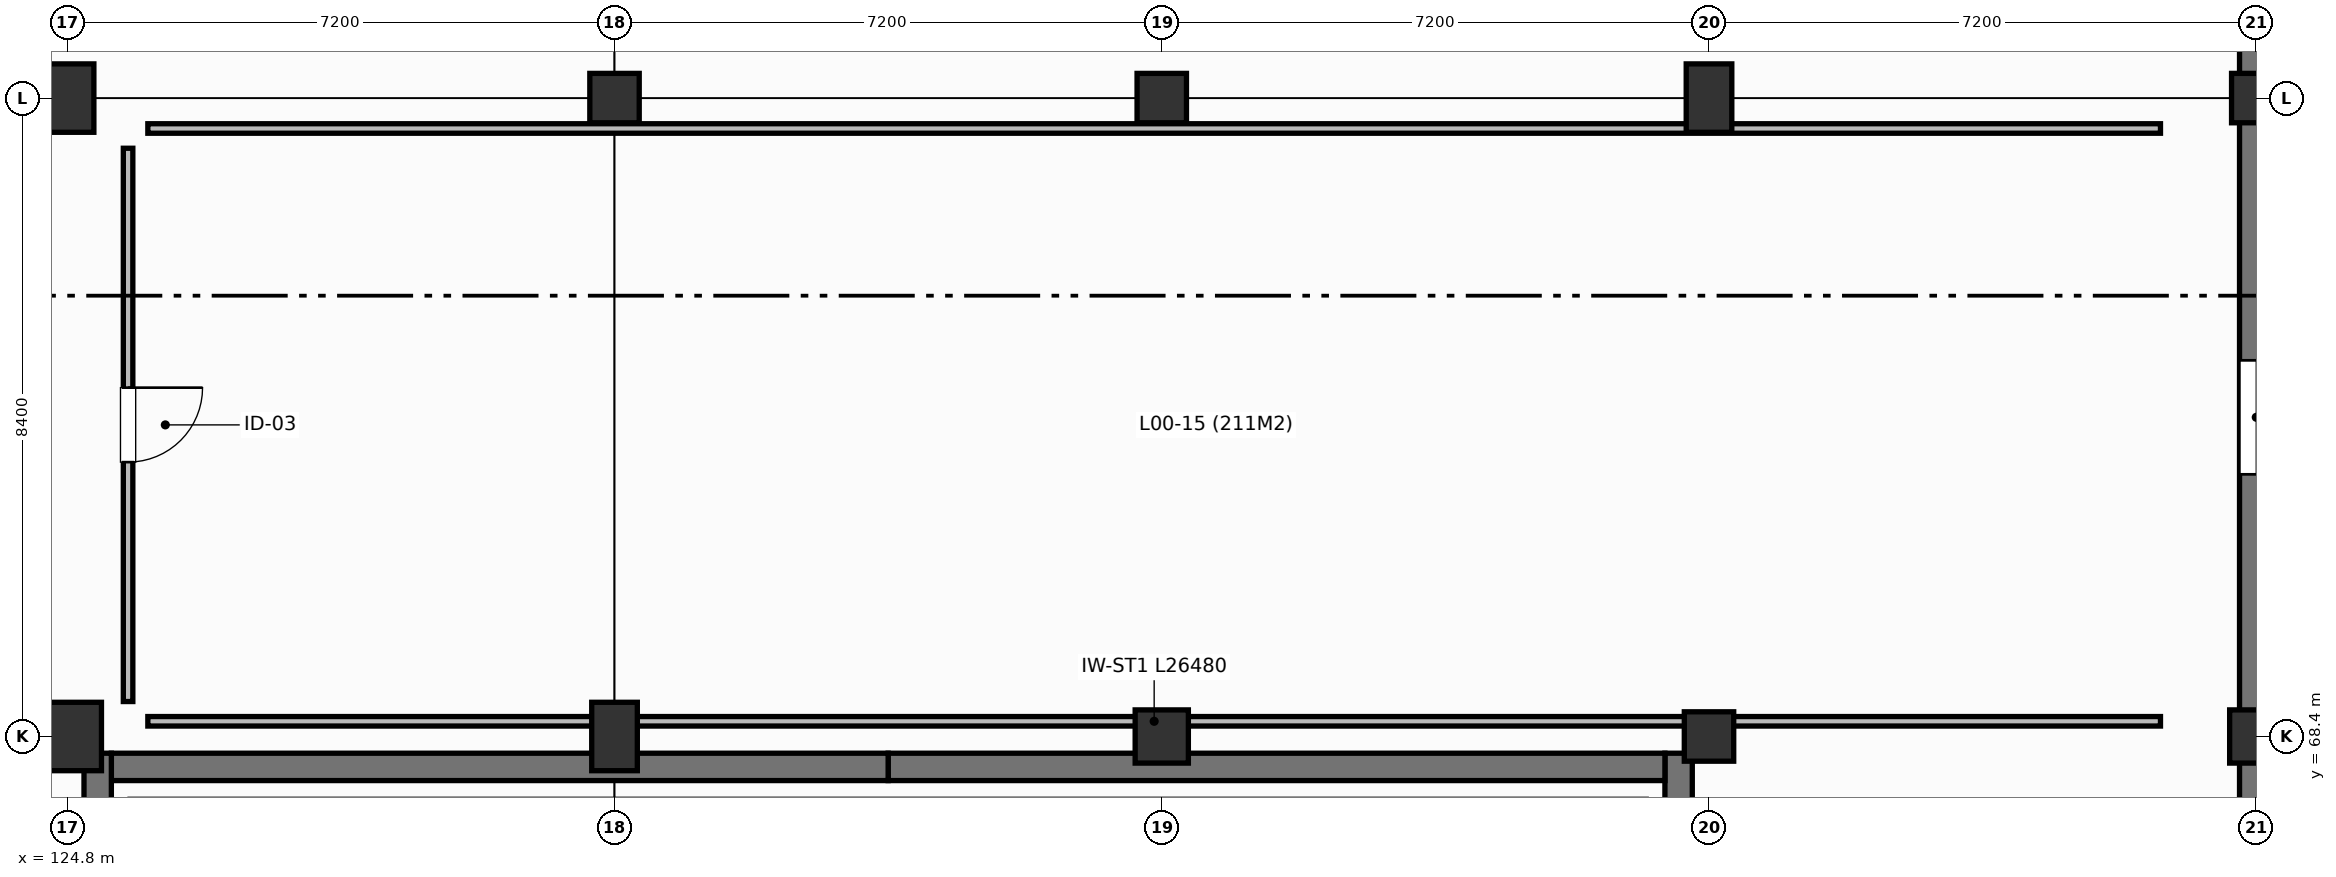
"""IFC4 building model, lengths in metres.
Left out: names, types, materials, properties, quantities, classifications, styles, units other than length and angle.
Written with IfcOpenShell. Run it as: python <this file> out.ifc"""

import sys

from ifc_helpers import new_model, si_unit, direction, frame, frame_2d, origin, origin_2d, place, context, subcontext, project, spatial, rectangle, extrude, element, fill, save


model = new_model("IFC4")
c1 = context("Model", 3, precision=1e-05, world=origin(), true_north=direction((0.0, 1.0)))
c2 = subcontext(c1, "Body", "Model", "MODEL_VIEW")
j1 = project(units=[si_unit("LENGTHUNIT", "METRE"), si_unit("PLANEANGLEUNIT", "RADIAN")], contexts=[c1])
p1 = place(None, origin())
s1 = spatial("IfcSite", under=j1, at=p1, CompositionType="ELEMENT")
p2 = place(p1, origin())
s2 = spatial("IfcBuilding", under=s1, at=p2, CompositionType="ELEMENT")
p3 = place(p2, origin())
s3 = spatial("IfcBuildingStorey", under=s2, at=p3, CompositionType="ELEMENT", Elevation=0.0)
p4 = place(p3, frame((124.8, 68.4, 0.0), z_axis=(0.0, 0.0, 1.0), x_axis=(1.0, 0.0, 0.0)))
e1 = element("IfcColumn", 1, at=p4, inside=s3, PredefinedType="COLUMN", context=c2, shape_type="SweptSolid", body=[
    extrude(rectangle(XDim=0.9, YDim=0.9, at=origin_2d()), origin(), (0.0, 0.0, 1.0), 4.8),
])
p5 = place(p3, frame((124.8, 76.8, 0.0), z_axis=(0.0, 0.0, 1.0), x_axis=(1.0, 0.0, 0.0)))
e2 = element("IfcColumn", 2, at=p5, inside=s3, PredefinedType="COLUMN", context=c2, shape_type="SweptSolid", body=[
    extrude(rectangle(XDim=0.7, YDim=0.9, at=origin_2d()), origin(), (0.0, 0.0, 1.0), 4.8),
])
p6 = place(p3, frame((132.0, 68.4, 0.0), z_axis=(0.0, 0.0, 1.0), x_axis=(1.0, 0.0, 0.0)))
e3 = element("IfcColumn", 3, at=p6, inside=s3, PredefinedType="COLUMN", context=c2, shape_type="SweptSolid", body=[
    extrude(rectangle(XDim=0.6, YDim=0.9, at=origin_2d()), origin(), (0.0, 0.0, 1.0), 4.8),
])
p7 = place(p3, frame((132.0, 76.8, 0.0), z_axis=(0.0, 0.0, 1.0), x_axis=(1.0, 0.0, 0.0)))
e4 = element("IfcColumn", 4, at=p7, inside=s3, PredefinedType="COLUMN", context=c2, shape_type="SweptSolid", body=[
    extrude(rectangle(XDim=0.65, YDim=0.65, at=origin_2d()), origin(), (0.0, 0.0, 1.0), 4.8),
])
p8 = place(p3, frame((139.2, 68.4, 0.0), z_axis=(0.0, 0.0, 1.0), x_axis=(1.0, 0.0, 0.0)))
e5 = element("IfcColumn", 5, at=p8, inside=s3, PredefinedType="COLUMN", context=c2, shape_type="SweptSolid", body=[
    extrude(rectangle(XDim=0.7, YDim=0.7, at=origin_2d()), origin(), (0.0, 0.0, 1.0), 4.8),
])
for number, where, z_axis, x_axis in (
    (6, (139.2, 76.8, 0.0), (0.0, 0.0, 1.0), (1.0, 0.0, 0.0)),
    (7, (146.4, 68.4, 0.0), (0.0, 0.0, 1.0), (1.0, 0.0, 0.0)),
):
    element("IfcColumn", number, at=place(p3, frame(where, z_axis=z_axis, x_axis=x_axis)), inside=s3, PredefinedType="COLUMN", context=c2, shape_type="SweptSolid", body=[
        extrude(rectangle(XDim=0.65, YDim=0.65, at=origin_2d()), origin(), (0.0, 0.0, 1.0), 4.8),
    ])
p9 = place(p3, frame((146.4, 76.8, 0.0), z_axis=(0.0, 0.0, 1.0), x_axis=(1.0, 0.0, 0.0)))
e8 = element("IfcColumn", 8, at=p9, inside=s3, PredefinedType="COLUMN", context=c2, shape_type="SweptSolid", body=[
    extrude(rectangle(XDim=0.6, YDim=0.9, at=origin_2d()), origin(), (0.0, 0.0, 1.0), 4.8),
])
p10 = place(p3, frame((153.6, 68.4, 0.0), z_axis=(0.0, 0.0, 1.0), x_axis=(1.0, 0.0, 0.0)))
e9 = element("IfcColumn", 9, at=p10, inside=s3, PredefinedType="COLUMN", context=c2, shape_type="SweptSolid", body=[
    extrude(rectangle(XDim=0.7, YDim=0.7, at=origin_2d()), origin(), (0.0, 0.0, 1.0), 4.8),
])
p11 = place(p3, frame((153.6, 76.8, 0.0), z_axis=(0.0, 0.0, 1.0), x_axis=(1.0, 0.0, 0.0)))
e10 = element("IfcColumn", 10, at=p11, inside=s3, PredefinedType="COLUMN", context=c2, shape_type="SweptSolid", body=[
    extrude(rectangle(XDim=0.65, YDim=0.65, at=origin_2d()), origin(), (0.0, 0.0, 1.0), 4.8),
])
p12 = place(p3, frame((153.6, 83.2, 0.0), z_axis=(0.0, 0.0, 1.0), x_axis=(0.0, -1.0, 0.0)))
e11 = element("IfcWall", 11, at=p12, inside=s3, PredefinedType="STANDARD", context=c2, shape_type="SweptSolid", body=[
    extrude(rectangle(XDim=6.4, YDim=0.44, at=frame_2d((3.2, 0.0))), origin(), (0.0, 0.0, 1.0), 4.44),
])
p13 = place(p12, frame((2.6, 0.0, 0.8)))
e12 = element("IfcOpeningElement", 12, at=p13, cuts=e11, PredefinedType="OPENING", context=c2, shape_type="SweptSolid", body=[
    extrude(rectangle(XDim=1.2, YDim=1.65, at=frame_2d((0.6, 0.825))), frame((0.0, 0.23, 0.0), z_axis=(0.0, -1.0, 0.0), x_axis=(1.0, 0.0, 0.0)), (0.0, 0.0, 1.0), 0.46),
])
p14 = place(p3, frame((153.6, 76.8, 0.0), z_axis=(0.0, 0.0, 1.0), x_axis=(0.0, -1.0, 0.0)))
e13 = element("IfcWall", 13, at=p14, inside=s3, PredefinedType="STANDARD", context=c2, shape_type="SweptSolid", body=[
    extrude(rectangle(XDim=8.4, YDim=0.44, at=frame_2d((4.2, 0.0))), origin(), (0.0, 0.0, 1.0), 4.44),
])
p15 = place(p14, frame((3.45, 0.0, 0.8)))
e14 = element("IfcOpeningElement", 14, at=p15, cuts=e13, PredefinedType="OPENING", context=c2, shape_type="SweptSolid", body=[
    extrude(rectangle(XDim=1.5, YDim=1.65, at=frame_2d((0.75, 0.825))), frame((0.0, 0.23, 0.0), z_axis=(0.0, -1.0, 0.0), x_axis=(1.0, 0.0, 0.0)), (0.0, 0.0, 1.0), 0.46),
])
p16 = place(p3, frame((153.6, 68.4, 0.0), z_axis=(0.0, 0.0, 1.0), x_axis=(0.0, -1.0, 0.0)))
e15 = element("IfcWall", 15, at=p16, inside=s3, PredefinedType="STANDARD", context=c2, shape_type="SweptSolid", body=[
    extrude(rectangle(XDim=8.4, YDim=0.44, at=frame_2d((4.2, 0.0))), origin(), (0.0, 0.0, 1.0), 4.44),
])
p17 = place(p16, frame((3.3, 0.0, 0.8)))
e16 = element("IfcOpeningElement", 16, at=p17, cuts=e15, PredefinedType="OPENING", context=c2, shape_type="SweptSolid", body=[
    extrude(rectangle(XDim=1.8, YDim=1.65, at=frame_2d((0.9, 0.825))), frame((0.0, 0.23, 0.0), z_axis=(0.0, -1.0, 0.0), x_axis=(1.0, 0.0, 0.0)), (0.0, 0.0, 1.0), 0.46),
])
p18 = place(p3, frame((146.0, 60.0, 0.0), z_axis=(0.0, 0.0, 1.0), x_axis=(0.0, 1.0, 0.0)))
e17 = element("IfcWall", 17, at=p18, inside=s3, PredefinedType="SHEAR", context=c2, shape_type="SweptSolid", body=[
    extrude(rectangle(XDim=8.18, YDim=0.36, at=frame_2d((4.09, 0.0))), origin(), (0.0, 0.0, 1.0), 4.8),
])
p19 = place(p18, frame((3.19, 0.0, 0.0)))
e18 = element("IfcOpeningElement", 18, at=p19, cuts=e17, PredefinedType="OPENING", context=c2, shape_type="SweptSolid", body=[
    extrude(rectangle(XDim=1.8, YDim=2.25, at=frame_2d((0.9, 1.125))), frame((0.0, 0.19, 0.0), z_axis=(0.0, -1.0, 0.0), x_axis=(1.0, 0.0, 0.0)), (0.0, 0.0, 1.0), 0.38),
])
p20 = place(p3, frame((145.82, 68.0, 0.0), z_axis=(0.0, 0.0, 1.0), x_axis=(-1.0, 0.0, 0.0)))
e19 = element("IfcWall", 19, at=p20, inside=s3, PredefinedType="SHEAR", context=c2, shape_type="SweptSolid", body=[
    extrude(rectangle(XDim=10.22, YDim=0.36, at=frame_2d((5.11, 0.0))), origin(), (0.0, 0.0, 1.0), 4.8),
])
p21 = place(p3, frame((135.6, 68.0, 0.0), z_axis=(0.0, 0.0, 1.0), x_axis=(-1.0, 0.0, 0.0)))
e20 = element("IfcWall", 20, at=p21, inside=s3, PredefinedType="SHEAR", context=c2, shape_type="SweptSolid", body=[
    extrude(rectangle(XDim=10.22, YDim=0.36, at=frame_2d((5.11, 0.0))), origin(), (0.0, 0.0, 1.0), 4.8),
])
p22 = place(p3, frame((125.2, 68.18, 0.0), z_axis=(0.0, 0.0, 1.0), x_axis=(0.0, -1.0, 0.0)))
e21 = element("IfcWall", 21, at=p22, inside=s3, PredefinedType="SHEAR", context=c2, shape_type="SweptSolid", body=[
    extrude(rectangle(XDim=8.18, YDim=0.36, at=frame_2d((4.09, 0.0))), origin(), (0.0, 0.0, 1.0), 4.8),
])
p23 = place(p3, frame((125.86, 68.6, 0.0), z_axis=(0.0, 0.0, 1.0), x_axis=(1.0, 0.0, 0.0)))
e22 = element("IfcWall", 22, at=p23, inside=s3, PredefinedType="PARTITIONING", context=c2, shape_type="SweptSolid", body=[
    extrude(rectangle(XDim=26.48, YDim=0.125, at=frame_2d((13.24, 0.0))), origin(), (0.0, 0.0, 1.0), 3.515),
])
p24 = place(p3, frame((152.34, 76.4, 0.0), z_axis=(0.0, 0.0, 1.0), x_axis=(-1.0, 0.0, 0.0)))
e23 = element("IfcWall", 23, at=p24, inside=s3, PredefinedType="PARTITIONING", context=c2, shape_type="SweptSolid", body=[
    extrude(rectangle(XDim=26.48, YDim=0.125, at=frame_2d((13.24, 0.0))), origin(), (0.0, 0.0, 1.0), 3.715),
])
p25 = place(p3, frame((125.6, 76.14, 0.0), z_axis=(0.0, 0.0, 1.0), x_axis=(0.0, -1.0, 0.0)))
e24 = element("IfcWall", 24, at=p25, inside=s3, PredefinedType="PARTITIONING", context=c2, shape_type="SweptSolid", body=[
    extrude(rectangle(XDim=7.28, YDim=0.125, at=frame_2d((3.64, 0.0))), origin(), (0.0, 0.0, 1.0), 4.44),
])
p26 = place(p25, frame((3.15, 0.0, 0.0)))
e25 = element("IfcOpeningElement", 25, at=p26, cuts=e24, PredefinedType="OPENING", context=c2, shape_type="SweptSolid", body=[
    extrude(rectangle(XDim=0.98, YDim=2.1, at=frame_2d((0.49, 1.05))), frame((0.0, 0.073, 0.0), z_axis=(0.0, -1.0, 0.0), x_axis=(1.0, 0.0, 0.0)), (0.0, 0.0, 1.0), 0.145),
])
p27 = place(p15, origin())
e26 = element("IfcWindow", 26, at=p27, inside=s3, PartitioningType="SINGLE_PANEL", PredefinedType="WINDOW", context=c2, shape_type="SweptSolid", body=[
    extrude(rectangle(XDim=1.5, YDim=1.65, at=frame_2d((0.75, 0.825))), frame((0.0, 0.03, 0.0), z_axis=(0.0, -1.0, 0.0), x_axis=(1.0, 0.0, 0.0)), (0.0, 0.0, 1.0), 0.06),
])
fill(e14, e26)
p28 = place(p26, origin())
e27 = element("IfcDoor", 27, at=p28, inside=s3, OperationType="SINGLE_SWING_LEFT", PredefinedType="DOOR", context=c2, shape_type="SweptSolid", body=[
    extrude(rectangle(XDim=0.98, YDim=2.1, at=frame_2d((0.49, 1.05))), frame((0.0, 0.025, 0.0), z_axis=(0.0, -1.0, 0.0), x_axis=(1.0, 0.0, 0.0)), (0.0, 0.0, 1.0), 0.05),
])
fill(e25, e27)
save(model, sys.argv[1])
